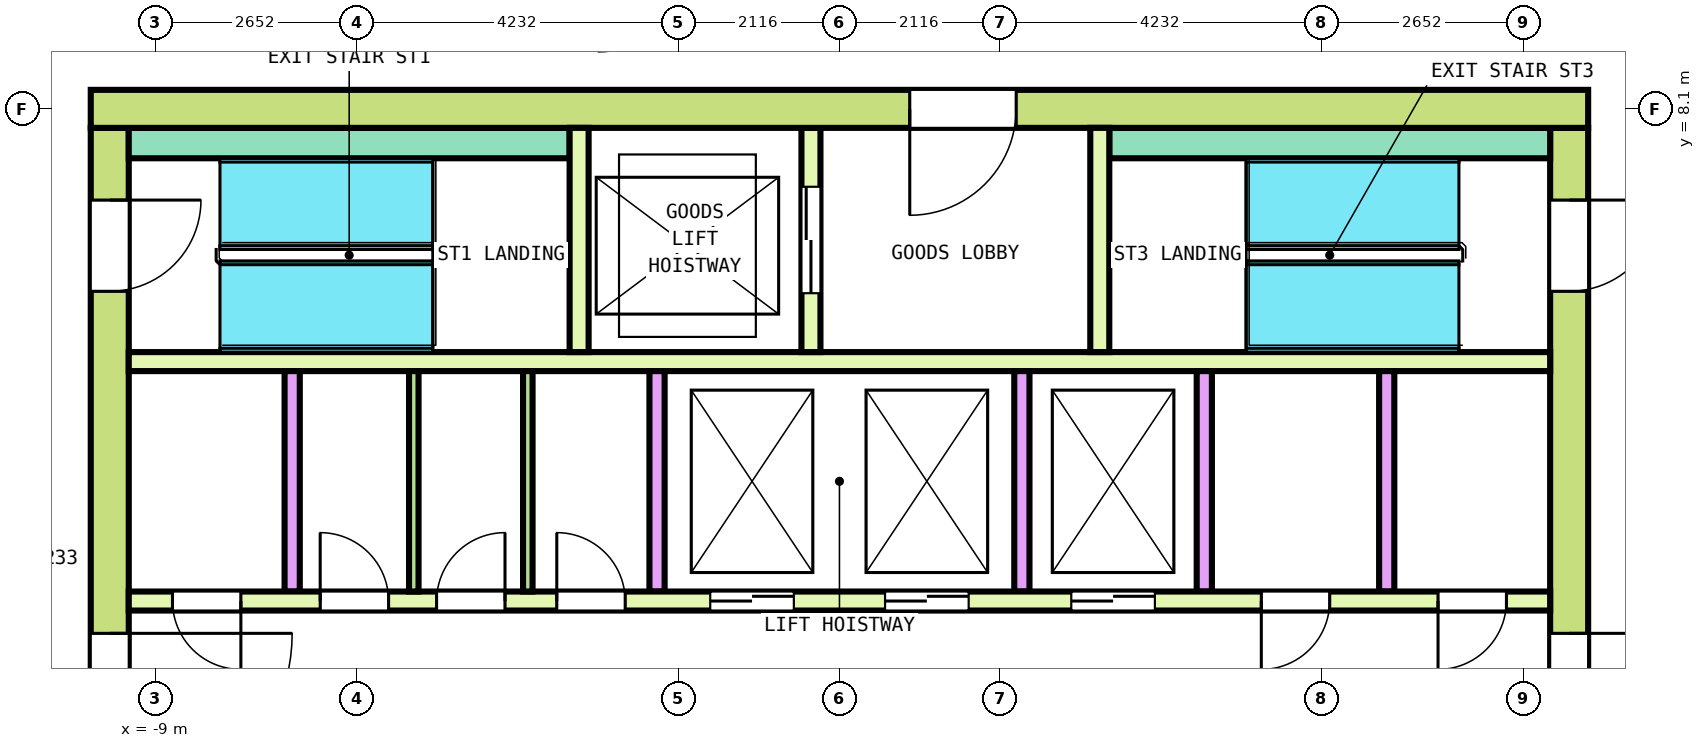
"""IFC4 building model, lengths in metres.
Left out: names, types, materials, properties, quantities, classifications, styles, units other than length and angle.
Written with IfcOpenShell. Run it as: python <this file> out.ifc"""

import sys

from ifc_helpers import new_model, si_unit, direction, frame, frame_2d, origin, place, context, subcontext, project, spatial, rectangle, extrude, element, fill, save


model = new_model("IFC4")
c1 = context("Model", 3, precision=1e-05, world=origin(), true_north=direction((0.0, 1.0)))
c2 = subcontext(c1, "Body", "Model", "MODEL_VIEW")
j1 = project(units=[si_unit("LENGTHUNIT", "METRE"), si_unit("PLANEANGLEUNIT", "RADIAN")], contexts=[c1])
p1 = place(None, origin())
s1 = spatial("IfcSite", under=j1, at=p1, CompositionType="ELEMENT")
p2 = place(p1, origin())
s2 = spatial("IfcBuilding", under=s1, at=p2, CompositionType="ELEMENT")
p3 = place(p2, frame((0.0, 0.0, 291.0)))
s3 = spatial("IfcBuildingStorey", under=s2, at=p3, CompositionType="ELEMENT", Elevation=291.0)
p4 = place(p3, frame((-9.85, 8.1, 0.0), z_axis=(0.0, 0.0, 1.0), x_axis=(1.0, 0.0, 0.0)))
e1 = element("IfcWall", 1, at=p4, inside=s3, PredefinedType="SHEAR", context=c2, shape_type="SweptSolid", body=[
    extrude(rectangle(XDim=19.7, YDim=0.5, at=frame_2d((9.85, 0.0))), origin(), (0.0, 0.0, 1.0), 3.7),
])
p5 = place(p4, frame((10.775, 0.0, 0.0)))
e2 = element("IfcOpeningElement", 2, at=p5, cuts=e1, PredefinedType="OPENING", context=c2, shape_type="SweptSolid", body=[
    extrude(rectangle(XDim=1.4, YDim=2.1, at=frame_2d((0.7, 1.05))), frame((0.0, 0.26, 0.0), z_axis=(0.0, -1.0, 0.0), x_axis=(1.0, 0.0, 0.0)), (0.0, 0.0, 1.0), 0.52),
])
p6 = place(p3, frame((-9.6, -7.85, 0.0), z_axis=(0.0, 0.0, 1.0), x_axis=(0.0, 1.0, 0.0)))
e3 = element("IfcWall", 3, at=p6, inside=s3, PredefinedType="SHEAR", context=c2, shape_type="SweptSolid", body=[
    extrude(rectangle(XDim=15.7, YDim=0.5, at=frame_2d((7.85, 0.0))), origin(), (0.0, 0.0, 1.0), 3.7),
])
p7 = place(p6, frame((6.65, 0.0, 0.0)))
e4 = element("IfcOpeningElement", 4, at=p7, cuts=e3, PredefinedType="OPENING", context=c2, shape_type="SweptSolid", body=[
    extrude(rectangle(XDim=2.4, YDim=2.1, at=frame_2d((1.2, 1.05))), frame((0.0, 0.26, 0.0), z_axis=(0.0, -1.0, 0.0), x_axis=(1.0, 0.0, 0.0)), (0.0, 0.0, 1.0), 0.52),
])
p8 = place(p6, frame((13.55, 0.0, 0.0)))
e5 = element("IfcOpeningElement", 5, at=p8, cuts=e3, PredefinedType="OPENING", context=c2, shape_type="SweptSolid", body=[
    extrude(rectangle(XDim=1.2, YDim=2.1, at=frame_2d((0.6, 1.05))), frame((0.0, 0.26, 0.0), z_axis=(0.0, -1.0, 0.0), x_axis=(1.0, 0.0, 0.0)), (0.0, 0.0, 1.0), 0.52),
])
p9 = place(p6, frame((0.95, 0.0, 0.0)))
e6 = element("IfcOpeningElement", 6, at=p9, cuts=e3, PredefinedType="OPENING", context=c2, shape_type="SweptSolid", body=[
    extrude(rectangle(XDim=1.2, YDim=2.1, at=frame_2d((0.6, 1.05))), frame((0.0, 0.26, 0.0), z_axis=(0.0, -1.0, 0.0), x_axis=(1.0, 0.0, 0.0)), (0.0, 0.0, 1.0), 0.52),
])
p10 = place(p3, frame((9.6, -7.85, 0.0), z_axis=(0.0, 0.0, 1.0), x_axis=(0.0, 1.0, 0.0)))
e7 = element("IfcWall", 7, at=p10, inside=s3, PredefinedType="SHEAR", context=c2, shape_type="SweptSolid", body=[
    extrude(rectangle(XDim=15.7, YDim=0.5, at=frame_2d((7.85, 0.0))), origin(), (0.0, 0.0, 1.0), 3.7),
])
p11 = place(p10, frame((6.65, 0.0, 0.0)))
e8 = element("IfcOpeningElement", 8, at=p11, cuts=e7, PredefinedType="OPENING", context=c2, shape_type="SweptSolid", body=[
    extrude(rectangle(XDim=2.4, YDim=2.1, at=frame_2d((1.2, 1.05))), frame((0.0, 0.26, 0.0), z_axis=(0.0, -1.0, 0.0), x_axis=(1.0, 0.0, 0.0)), (0.0, 0.0, 1.0), 0.52),
])
p12 = place(p10, frame((13.55, 0.0, 0.0)))
e9 = element("IfcOpeningElement", 9, at=p12, cuts=e7, PredefinedType="OPENING", context=c2, shape_type="SweptSolid", body=[
    extrude(rectangle(XDim=1.2, YDim=2.1, at=frame_2d((0.6, 1.05))), frame((0.0, 0.26, 0.0), z_axis=(0.0, -1.0, 0.0), x_axis=(1.0, 0.0, 0.0)), (0.0, 0.0, 1.0), 0.52),
])
p13 = place(p10, frame((1.05, 0.0, 0.0)))
e10 = element("IfcOpeningElement", 10, at=p13, cuts=e7, PredefinedType="OPENING", context=c2, shape_type="SweptSolid", body=[
    extrude(rectangle(XDim=1.0, YDim=2.1, at=frame_2d((0.5, 1.05))), frame((0.0, 0.26, 0.0), z_axis=(0.0, -1.0, 0.0), x_axis=(1.0, 0.0, 0.0)), (0.0, 0.0, 1.0), 0.52),
])
p14 = place(p3, frame((-9.35, 1.625, 0.0), z_axis=(0.0, 0.0, 1.0), x_axis=(1.0, 0.0, 0.0)))
e11 = element("IfcWall", 11, at=p14, inside=s3, PredefinedType="SOLIDWALL", context=c2, shape_type="SweptSolid", body=[
    extrude(rectangle(XDim=18.7, YDim=0.25, at=frame_2d((9.35, 0.0))), origin(), (0.0, 0.0, 1.0), 3.7),
])
p15 = place(p14, frame((7.65, 0.0, 0.0)))
e12 = element("IfcOpeningElement", 12, at=p15, cuts=e11, PredefinedType="OPENING", context=c2, shape_type="SweptSolid", body=[
    extrude(rectangle(XDim=1.1, YDim=2.1, at=frame_2d((0.55, 1.05))), frame((0.0, 0.135, 0.0), z_axis=(0.0, -1.0, 0.0), x_axis=(1.0, 0.0, 0.0)), (0.0, 0.0, 1.0), 0.27),
])
p16 = place(p14, frame((9.95, 0.0, 0.0)))
e13 = element("IfcOpeningElement", 13, at=p16, cuts=e11, PredefinedType="OPENING", context=c2, shape_type="SweptSolid", body=[
    extrude(rectangle(XDim=1.1, YDim=2.1, at=frame_2d((0.55, 1.05))), frame((0.0, 0.135, 0.0), z_axis=(0.0, -1.0, 0.0), x_axis=(1.0, 0.0, 0.0)), (0.0, 0.0, 1.0), 0.27),
])
p17 = place(p14, frame((12.4, 0.0, 0.0)))
e14 = element("IfcOpeningElement", 14, at=p17, cuts=e11, PredefinedType="OPENING", context=c2, shape_type="SweptSolid", body=[
    extrude(rectangle(XDim=1.1, YDim=2.1, at=frame_2d((0.55, 1.05))), frame((0.0, 0.135, 0.0), z_axis=(0.0, -1.0, 0.0), x_axis=(1.0, 0.0, 0.0)), (0.0, 0.0, 1.0), 0.27),
])
p18 = place(p14, frame((0.575, 0.0, 0.0)))
e15 = element("IfcOpeningElement", 15, at=p18, cuts=e11, PredefinedType="OPENING", context=c2, shape_type="SweptSolid", body=[
    extrude(rectangle(XDim=0.9, YDim=2.1, at=frame_2d((0.45, 1.05))), frame((0.0, 0.135, 0.0), z_axis=(0.0, -1.0, 0.0), x_axis=(1.0, 0.0, 0.0)), (0.0, 0.0, 1.0), 0.27),
])
p19 = place(p14, frame((2.519, 0.0, 0.0)))
e16 = element("IfcOpeningElement", 16, at=p19, cuts=e11, PredefinedType="OPENING", context=c2, shape_type="SweptSolid", body=[
    extrude(rectangle(XDim=0.9, YDim=2.1, at=frame_2d((0.45, 1.05))), frame((0.0, 0.135, 0.0), z_axis=(0.0, -1.0, 0.0), x_axis=(1.0, 0.0, 0.0)), (0.0, 0.0, 1.0), 0.27),
])
p20 = place(p14, frame((4.05, 0.0, 0.0)))
e17 = element("IfcOpeningElement", 17, at=p20, cuts=e11, PredefinedType="OPENING", context=c2, shape_type="SweptSolid", body=[
    extrude(rectangle(XDim=0.9, YDim=2.1, at=frame_2d((0.45, 1.05))), frame((0.0, 0.135, 0.0), z_axis=(0.0, -1.0, 0.0), x_axis=(1.0, 0.0, 0.0)), (0.0, 0.0, 1.0), 0.27),
])
p21 = place(p14, frame((5.631, 0.0, 0.0)))
e18 = element("IfcOpeningElement", 18, at=p21, cuts=e11, PredefinedType="OPENING", context=c2, shape_type="SweptSolid", body=[
    extrude(rectangle(XDim=0.9, YDim=2.1, at=frame_2d((0.45, 1.05))), frame((0.0, 0.135, 0.0), z_axis=(0.0, -1.0, 0.0), x_axis=(1.0, 0.0, 0.0)), (0.0, 0.0, 1.0), 0.27),
])
p22 = place(p14, frame((14.9, 0.0, 0.0)))
e19 = element("IfcOpeningElement", 19, at=p22, cuts=e11, PredefinedType="OPENING", context=c2, shape_type="SweptSolid", body=[
    extrude(rectangle(XDim=0.9, YDim=2.1, at=frame_2d((0.45, 1.05))), frame((0.0, 0.135, 0.0), z_axis=(0.0, -1.0, 0.0), x_axis=(1.0, 0.0, 0.0)), (0.0, 0.0, 1.0), 0.27),
])
p23 = place(p14, frame((17.225, 0.0, 0.0)))
e20 = element("IfcOpeningElement", 20, at=p23, cuts=e11, PredefinedType="OPENING", context=c2, shape_type="SweptSolid", body=[
    extrude(rectangle(XDim=0.9, YDim=2.1, at=frame_2d((0.45, 1.05))), frame((0.0, 0.135, 0.0), z_axis=(0.0, -1.0, 0.0), x_axis=(1.0, 0.0, 0.0)), (0.0, 0.0, 1.0), 0.27),
])
p24 = place(p3, frame((-9.35, 4.775, 0.0), z_axis=(0.0, 0.0, 1.0), x_axis=(1.0, 0.0, 0.0)))
e21 = element("IfcWall", 21, at=p24, inside=s3, PredefinedType="SOLIDWALL", context=c2, shape_type="SweptSolid", body=[
    extrude(rectangle(XDim=18.7, YDim=0.25, at=frame_2d((9.35, 0.0))), origin(), (0.0, 0.0, 1.0), 3.7),
])
for number, where, z_axis, x_axis in (
    (22, (-7.2, 1.75, 0.0), (0.0, 0.0, 1.0), (0.0, 1.0, 0.0)),
    (23, (-2.4, 1.75, 0.0), (0.0, 0.0, 1.0), (0.0, 1.0, 0.0)),
    (24, (2.4, 1.75, 0.0), (0.0, 0.0, 1.0), (0.0, 1.0, 0.0)),
    (25, (4.8, 1.75, 0.0), (0.0, 0.0, 1.0), (0.0, 1.0, 0.0)),
    (26, (7.2, 1.75, 0.0), (0.0, 0.0, 1.0), (0.0, 1.0, 0.0)),
):
    element("IfcWall", number, at=place(p3, frame(where, z_axis=z_axis, x_axis=x_axis)), inside=s3, PredefinedType="SOLIDWALL", context=c2, shape_type="SweptSolid", body=[
        extrude(rectangle(XDim=2.9, YDim=0.2, at=frame_2d((1.45, 0.0))), origin(), (0.0, 0.0, 1.0), 3.7),
    ])
for number, where, z_axis, x_axis in (
    (27, (-9.35, 7.65, 0.0), (0.0, 0.0, 1.0), (1.0, 0.0, 0.0)),
    (28, (3.55, 7.65, 0.0), (0.0, 0.0, 1.0), (1.0, 0.0, 0.0)),
):
    element("IfcWall", number, at=place(p3, frame(where, z_axis=z_axis, x_axis=x_axis)), inside=s3, PredefinedType="SOLIDWALL", context=c2, shape_type="SweptSolid", body=[
        extrude(rectangle(XDim=5.8, YDim=0.4, at=frame_2d((2.9, 0.0))), origin(), (0.0, 0.0, 1.0), 3.7),
    ])
p25 = place(p3, frame((-3.425, 4.9, 0.0), z_axis=(0.0, 0.0, 1.0), x_axis=(0.0, 1.0, 0.0)))
e29 = element("IfcWall", 29, at=p25, inside=s3, PredefinedType="SOLIDWALL", context=c2, shape_type="SweptSolid", body=[
    extrude(rectangle(XDim=2.95, YDim=0.25, at=frame_2d((1.475, 0.0))), origin(), (0.0, 0.0, 1.0), 3.7),
])
p26 = place(p3, frame((-0.375, 4.9, 0.0), z_axis=(0.0, 0.0, 1.0), x_axis=(0.0, 1.0, 0.0)))
e30 = element("IfcWall", 30, at=p26, inside=s3, PredefinedType="SOLIDWALL", context=c2, shape_type="SweptSolid", body=[
    extrude(rectangle(XDim=2.95, YDim=0.25, at=frame_2d((1.475, 0.0))), origin(), (0.0, 0.0, 1.0), 3.7),
])
p27 = place(p26, frame((0.775, 0.0, 0.0)))
e31 = element("IfcOpeningElement", 31, at=p27, cuts=e30, PredefinedType="OPENING", context=c2, shape_type="SweptSolid", body=[
    extrude(rectangle(XDim=1.4, YDim=2.1, at=frame_2d((0.7, 1.05))), frame((0.0, 0.135, 0.0), z_axis=(0.0, -1.0, 0.0), x_axis=(1.0, 0.0, 0.0)), (0.0, 0.0, 1.0), 0.27),
])
p28 = place(p3, frame((3.425, 4.9, 0.0), z_axis=(0.0, 0.0, 1.0), x_axis=(0.0, 1.0, 0.0)))
e32 = element("IfcWall", 32, at=p28, inside=s3, PredefinedType="SOLIDWALL", context=c2, shape_type="SweptSolid", body=[
    extrude(rectangle(XDim=2.95, YDim=0.25, at=frame_2d((1.475, 0.0))), origin(), (0.0, 0.0, 1.0), 3.7),
])
for number, where, z_axis, x_axis in (
    (33, (-5.6, 1.75, 0.0), (0.0, 0.0, 1.0), (0.0, 1.0, 0.0)),
    (34, (-4.1, 1.75, 0.0), (0.0, 0.0, 1.0), (0.0, 1.0, 0.0)),
):
    element("IfcWall", number, at=place(p3, frame(where, z_axis=z_axis, x_axis=x_axis)), inside=s3, PredefinedType="PARTITIONING", context=c2, shape_type="SweptSolid", body=[
        extrude(rectangle(XDim=2.9, YDim=0.125, at=frame_2d((1.45, 0.0))), origin(), (0.0, 0.0, 1.0), 3.7),
    ])
p29 = place(p15, origin())
e35 = element("IfcDoor", 35, at=p29, inside=s3, OperationType="DOUBLE_DOOR_SLIDING", PredefinedType="DOOR", context=c2, shape_type="SweptSolid", body=[
    extrude(rectangle(XDim=1.1, YDim=2.1, at=frame_2d((0.55, 1.05))), frame((0.0, 0.075, 0.0), z_axis=(0.0, -1.0, 0.0), x_axis=(1.0, 0.0, 0.0)), (0.0, 0.0, 1.0), 0.15),
])
fill(e12, e35)
p30 = place(p16, origin())
e36 = element("IfcDoor", 36, at=p30, inside=s3, OperationType="DOUBLE_DOOR_SLIDING", PredefinedType="DOOR", context=c2, shape_type="SweptSolid", body=[
    extrude(rectangle(XDim=1.1, YDim=2.1, at=frame_2d((0.55, 1.05))), frame((0.0, 0.075, 0.0), z_axis=(0.0, -1.0, 0.0), x_axis=(1.0, 0.0, 0.0)), (0.0, 0.0, 1.0), 0.15),
])
fill(e13, e36)
p31 = place(p17, origin())
e37 = element("IfcDoor", 37, at=p31, inside=s3, OperationType="DOUBLE_DOOR_SLIDING", PredefinedType="DOOR", context=c2, shape_type="SweptSolid", body=[
    extrude(rectangle(XDim=1.1, YDim=2.1, at=frame_2d((0.55, 1.05))), frame((0.0, 0.075, 0.0), z_axis=(0.0, -1.0, 0.0), x_axis=(1.0, 0.0, 0.0)), (0.0, 0.0, 1.0), 0.15),
])
fill(e14, e37)
p32 = place(p27, origin())
e38 = element("IfcDoor", 38, at=p32, inside=s3, OperationType="DOUBLE_DOOR_SLIDING", PredefinedType="DOOR", context=c2, shape_type="SweptSolid", body=[
    extrude(rectangle(XDim=1.4, YDim=2.1, at=frame_2d((0.7, 1.05))), frame((0.0, 0.075, 0.0), z_axis=(0.0, -1.0, 0.0), x_axis=(1.0, 0.0, 0.0)), (0.0, 0.0, 1.0), 0.15),
])
fill(e31, e38)
p33 = place(p7, origin())
e39 = element("IfcDoor", 39, at=p33, inside=s3, OperationType="DOUBLE_DOOR_SINGLE_SWING", PredefinedType="DOOR", context=c2, shape_type="SweptSolid", body=[
    extrude(rectangle(XDim=2.4, YDim=2.1, at=frame_2d((1.2, 1.05))), frame((0.0, 0.2, 0.0), z_axis=(0.0, -1.0, 0.0), x_axis=(1.0, 0.0, 0.0)), (0.0, 0.0, 1.0), 0.4),
])
fill(e4, e39)
p34 = place(p11, origin())
e40 = element("IfcDoor", 40, at=p34, inside=s3, OperationType="DOUBLE_DOOR_SINGLE_SWING", PredefinedType="DOOR", context=c2, shape_type="SweptSolid", body=[
    extrude(rectangle(XDim=2.4, YDim=2.1, at=frame_2d((1.2, 1.05))), frame((0.0, 0.2, 0.0), z_axis=(0.0, -1.0, 0.0), x_axis=(1.0, 0.0, 0.0)), (0.0, 0.0, 1.0), 0.4),
])
fill(e8, e40)
p35 = place(p8, origin())
e41 = element("IfcDoor", 41, at=p35, inside=s3, OperationType="SINGLE_SWING_LEFT", PredefinedType="DOOR", context=c2, shape_type="SweptSolid", body=[
    extrude(rectangle(XDim=1.2, YDim=2.1, at=frame_2d((0.6, 1.05))), frame((0.0, 0.2, 0.0), z_axis=(0.0, -1.0, 0.0), x_axis=(1.0, 0.0, 0.0)), (0.0, 0.0, 1.0), 0.4),
])
fill(e5, e41)
p36 = place(p12, origin())
e42 = element("IfcDoor", 42, at=p36, inside=s3, OperationType="SINGLE_SWING_LEFT", PredefinedType="DOOR", context=c2, shape_type="SweptSolid", body=[
    extrude(rectangle(XDim=1.2, YDim=2.1, at=frame_2d((0.6, 1.05))), frame((0.0, 0.2, 0.0), z_axis=(0.0, -1.0, 0.0), x_axis=(1.0, 0.0, 0.0)), (0.0, 0.0, 1.0), 0.4),
])
fill(e9, e42)
p37 = place(p5, origin())
e43 = element("IfcDoor", 43, at=p37, inside=s3, OperationType="DOUBLE_DOOR_SINGLE_SWING", PredefinedType="DOOR", context=c2, shape_type="SweptSolid", body=[
    extrude(rectangle(XDim=1.4, YDim=2.1, at=frame_2d((0.7, 1.05))), frame((0.0, 0.2, 0.0), z_axis=(0.0, -1.0, 0.0), x_axis=(1.0, 0.0, 0.0)), (0.0, 0.0, 1.0), 0.4),
])
fill(e2, e43)
p38 = place(p18, origin())
e44 = element("IfcDoor", 44, at=p38, inside=s3, OperationType="SINGLE_SWING_LEFT", PredefinedType="DOOR", context=c2, shape_type="SweptSolid", body=[
    extrude(rectangle(XDim=0.9, YDim=2.1, at=frame_2d((0.45, 1.05))), frame((0.0, 0.075, 0.0), z_axis=(0.0, -1.0, 0.0), x_axis=(1.0, 0.0, 0.0)), (0.0, 0.0, 1.0), 0.15),
])
fill(e15, e44)
p39 = place(p19, origin())
e45 = element("IfcDoor", 45, at=p39, inside=s3, OperationType="SINGLE_SWING_RIGHT", PredefinedType="DOOR", context=c2, shape_type="SweptSolid", body=[
    extrude(rectangle(XDim=0.9, YDim=2.1, at=frame_2d((0.45, 1.05))), frame((0.0, 0.075, 0.0), z_axis=(0.0, -1.0, 0.0), x_axis=(1.0, 0.0, 0.0)), (0.0, 0.0, 1.0), 0.15),
])
fill(e16, e45)
p40 = place(p20, origin())
e46 = element("IfcDoor", 46, at=p40, inside=s3, OperationType="SINGLE_SWING_LEFT", PredefinedType="DOOR", context=c2, shape_type="SweptSolid", body=[
    extrude(rectangle(XDim=0.9, YDim=2.1, at=frame_2d((0.45, 1.05))), frame((0.0, 0.075, 0.0), z_axis=(0.0, -1.0, 0.0), x_axis=(1.0, 0.0, 0.0)), (0.0, 0.0, 1.0), 0.15),
])
fill(e17, e46)
p41 = place(p21, origin())
e47 = element("IfcDoor", 47, at=p41, inside=s3, OperationType="SINGLE_SWING_RIGHT", PredefinedType="DOOR", context=c2, shape_type="SweptSolid", body=[
    extrude(rectangle(XDim=0.9, YDim=2.1, at=frame_2d((0.45, 1.05))), frame((0.0, 0.075, 0.0), z_axis=(0.0, -1.0, 0.0), x_axis=(1.0, 0.0, 0.0)), (0.0, 0.0, 1.0), 0.15),
])
fill(e18, e47)
p42 = place(p22, origin())
e48 = element("IfcDoor", 48, at=p42, inside=s3, OperationType="SINGLE_SWING_LEFT", PredefinedType="DOOR", context=c2, shape_type="SweptSolid", body=[
    extrude(rectangle(XDim=0.9, YDim=2.1, at=frame_2d((0.45, 1.05))), frame((0.0, 0.075, 0.0), z_axis=(0.0, -1.0, 0.0), x_axis=(1.0, 0.0, 0.0)), (0.0, 0.0, 1.0), 0.15),
])
fill(e19, e48)
p43 = place(p23, origin())
e49 = element("IfcDoor", 49, at=p43, inside=s3, OperationType="SINGLE_SWING_RIGHT", PredefinedType="DOOR", context=c2, shape_type="SweptSolid", body=[
    extrude(rectangle(XDim=0.9, YDim=2.1, at=frame_2d((0.45, 1.05))), frame((0.0, 0.075, 0.0), z_axis=(0.0, -1.0, 0.0), x_axis=(1.0, 0.0, 0.0)), (0.0, 0.0, 1.0), 0.15),
])
fill(e20, e49)
save(model, sys.argv[1])
